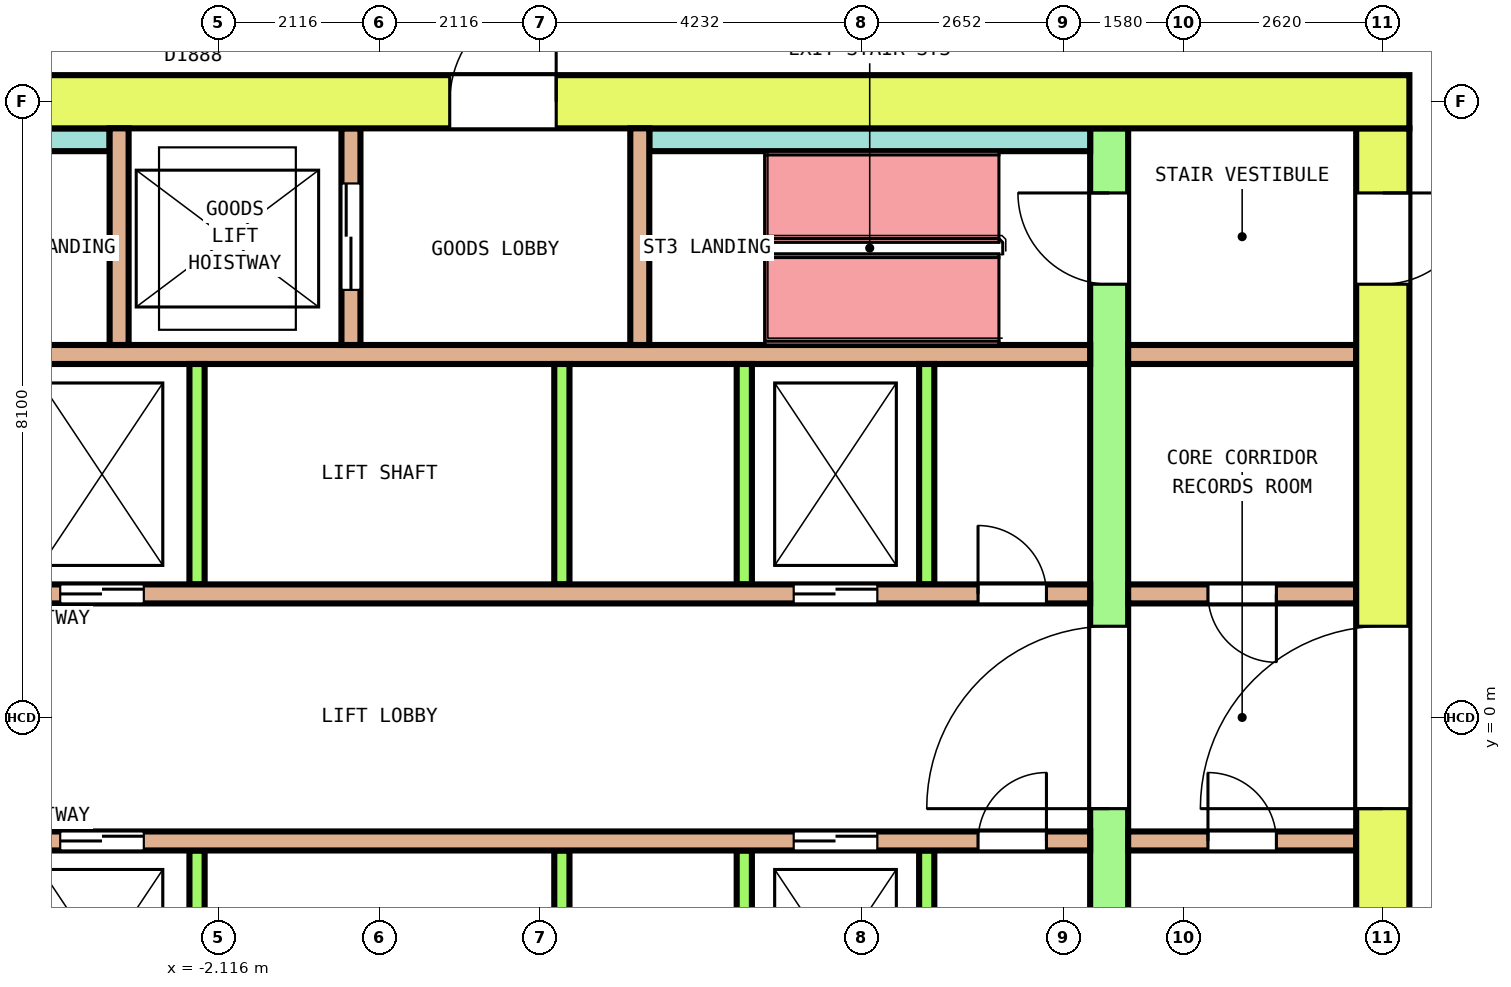
"""IFC4 building model, lengths in metres.
Left out: names, types, materials, properties, quantities, classifications, styles, units other than length and angle.
Written with IfcOpenShell. Run it as: python <this file> out.ifc"""

import sys

from ifc_helpers import new_model, si_unit, direction, frame, frame_2d, origin, place, context, subcontext, project, spatial, rectangle, extrude, element, fill, save


model = new_model("IFC4")
c1 = context("Model", 3, precision=1e-05, world=origin(), true_north=direction((0.0, 1.0)))
c2 = subcontext(c1, "Body", "Model", "MODEL_VIEW")
j1 = project(units=[si_unit("LENGTHUNIT", "METRE"), si_unit("PLANEANGLEUNIT", "RADIAN")], contexts=[c1])
p1 = place(None, origin())
s1 = spatial("IfcSite", under=j1, at=p1, CompositionType="ELEMENT")
p2 = place(p1, origin())
s2 = spatial("IfcBuilding", under=s1, at=p2, CompositionType="ELEMENT")
p3 = place(p2, frame((0.0, 0.0, 189.2)))
s3 = spatial("IfcBuildingStorey", under=s2, at=p3, CompositionType="ELEMENT", Elevation=189.2)
p4 = place(p3, frame((-13.55, 8.1, 0.0), z_axis=(0.0, 0.0, 1.0), x_axis=(1.0, 0.0, 0.0)))
e1 = element("IfcWall", 1, at=p4, inside=s3, PredefinedType="SHEAR", context=c2, shape_type="SweptSolid", body=[
    extrude(rectangle(XDim=27.1, YDim=0.7, at=frame_2d((13.55, 0.0))), origin(), (0.0, 0.0, 1.0), 4.1),
])
p5 = place(p4, frame((14.475, 0.0, 0.0)))
e2 = element("IfcOpeningElement", 2, at=p5, cuts=e1, PredefinedType="OPENING", context=c2, shape_type="SweptSolid", body=[
    extrude(rectangle(XDim=1.4, YDim=2.1, at=frame_2d((0.7, 1.05))), frame((0.0, 0.36, 0.0), z_axis=(0.0, -1.0, 0.0), x_axis=(1.0, 0.0, 0.0)), (0.0, 0.0, 1.0), 0.72),
])
p6 = place(p3, frame((13.2, -7.75, 0.0), z_axis=(0.0, 0.0, 1.0), x_axis=(0.0, 1.0, 0.0)))
e3 = element("IfcWall", 3, at=p6, inside=s3, PredefinedType="SHEAR", context=c2, shape_type="SweptSolid", body=[
    extrude(rectangle(XDim=15.5, YDim=0.7, at=frame_2d((7.75, 0.0))), origin(), (0.0, 0.0, 1.0), 4.1),
])
p7 = place(p6, frame((6.55, 0.0, 0.0)))
e4 = element("IfcOpeningElement", 4, at=p7, cuts=e3, PredefinedType="OPENING", context=c2, shape_type="SweptSolid", body=[
    extrude(rectangle(XDim=2.4, YDim=2.1, at=frame_2d((1.2, 1.05))), frame((0.0, 0.36, 0.0), z_axis=(0.0, -1.0, 0.0), x_axis=(1.0, 0.0, 0.0)), (0.0, 0.0, 1.0), 0.72),
])
p8 = place(p6, frame((13.45, 0.0, 0.0)))
e5 = element("IfcOpeningElement", 5, at=p8, cuts=e3, PredefinedType="OPENING", context=c2, shape_type="SweptSolid", body=[
    extrude(rectangle(XDim=1.2, YDim=2.1, at=frame_2d((0.6, 1.05))), frame((0.0, 0.36, 0.0), z_axis=(0.0, -1.0, 0.0), x_axis=(1.0, 0.0, 0.0)), (0.0, 0.0, 1.0), 0.72),
])
p9 = place(p6, frame((0.181, 0.0, 0.0)))
e6 = element("IfcOpeningElement", 6, at=p9, cuts=e3, PredefinedType="OPENING", context=c2, shape_type="SweptSolid", body=[
    extrude(rectangle(XDim=1.0, YDim=2.1, at=frame_2d((0.5, 1.05))), frame((0.0, 0.36, 0.0), z_axis=(0.0, -1.0, 0.0), x_axis=(1.0, 0.0, 0.0)), (0.0, 0.0, 1.0), 0.72),
])
p10 = place(p6, frame((1.669, 0.0, 0.0)))
e7 = element("IfcOpeningElement", 7, at=p10, cuts=e3, PredefinedType="OPENING", context=c2, shape_type="SweptSolid", body=[
    extrude(rectangle(XDim=1.0, YDim=2.1, at=frame_2d((0.5, 1.05))), frame((0.0, 0.36, 0.0), z_axis=(0.0, -1.0, 0.0), x_axis=(1.0, 0.0, 0.0)), (0.0, 0.0, 1.0), 0.72),
])
p11 = place(p3, frame((9.6, -7.75, 0.0), z_axis=(0.0, 0.0, 1.0), x_axis=(0.0, 1.0, 0.0)))
e8 = element("IfcWall", 8, at=p11, inside=s3, PredefinedType="SHEAR", context=c2, shape_type="SweptSolid", body=[
    extrude(rectangle(XDim=15.5, YDim=0.5, at=frame_2d((7.75, 0.0))), origin(), (0.0, 0.0, 1.0), 4.1),
])
p12 = place(p11, frame((6.55, 0.0, 0.0)))
e9 = element("IfcOpeningElement", 9, at=p12, cuts=e8, PredefinedType="OPENING", context=c2, shape_type="SweptSolid", body=[
    extrude(rectangle(XDim=2.4, YDim=2.1, at=frame_2d((1.2, 1.05))), frame((0.0, 0.26, 0.0), z_axis=(0.0, -1.0, 0.0), x_axis=(1.0, 0.0, 0.0)), (0.0, 0.0, 1.0), 0.52),
])
p13 = place(p11, frame((13.45, 0.0, 0.0)))
e10 = element("IfcOpeningElement", 10, at=p13, cuts=e8, PredefinedType="OPENING", context=c2, shape_type="SweptSolid", body=[
    extrude(rectangle(XDim=1.2, YDim=2.1, at=frame_2d((0.6, 1.05))), frame((0.0, 0.26, 0.0), z_axis=(0.0, -1.0, 0.0), x_axis=(1.0, 0.0, 0.0)), (0.0, 0.0, 1.0), 0.52),
])
p14 = place(p11, frame((0.95, 0.0, 0.0)))
e11 = element("IfcOpeningElement", 11, at=p14, cuts=e8, PredefinedType="OPENING", context=c2, shape_type="SweptSolid", body=[
    extrude(rectangle(XDim=1.0, YDim=2.1, at=frame_2d((0.5, 1.05))), frame((0.0, 0.26, 0.0), z_axis=(0.0, -1.0, 0.0), x_axis=(1.0, 0.0, 0.0)), (0.0, 0.0, 1.0), 0.52),
])
p15 = place(p3, frame((-9.35, 1.625, 0.0), z_axis=(0.0, 0.0, 1.0), x_axis=(1.0, 0.0, 0.0)))
e12 = element("IfcWall", 12, at=p15, inside=s3, PredefinedType="SOLIDWALL", context=c2, shape_type="SweptSolid", body=[
    extrude(rectangle(XDim=18.7, YDim=0.25, at=frame_2d((9.35, 0.0))), origin(), (0.0, 0.0, 1.0), 4.1),
])
p16 = place(p15, frame((2.85, 0.0, 0.0)))
e13 = element("IfcOpeningElement", 13, at=p16, cuts=e12, PredefinedType="OPENING", context=c2, shape_type="SweptSolid", body=[
    extrude(rectangle(XDim=1.1, YDim=2.1, at=frame_2d((0.55, 1.05))), frame((0.0, 0.135, 0.0), z_axis=(0.0, -1.0, 0.0), x_axis=(1.0, 0.0, 0.0)), (0.0, 0.0, 1.0), 0.27),
])
p17 = place(p15, frame((5.15, 0.0, 0.0)))
e14 = element("IfcOpeningElement", 14, at=p17, cuts=e12, PredefinedType="OPENING", context=c2, shape_type="SweptSolid", body=[
    extrude(rectangle(XDim=1.1, YDim=2.1, at=frame_2d((0.55, 1.05))), frame((0.0, 0.135, 0.0), z_axis=(0.0, -1.0, 0.0), x_axis=(1.0, 0.0, 0.0)), (0.0, 0.0, 1.0), 0.27),
])
p18 = place(p15, frame((14.8, 0.0, 0.0)))
e15 = element("IfcOpeningElement", 15, at=p18, cuts=e12, PredefinedType="OPENING", context=c2, shape_type="SweptSolid", body=[
    extrude(rectangle(XDim=1.1, YDim=2.1, at=frame_2d((0.55, 1.05))), frame((0.0, 0.135, 0.0), z_axis=(0.0, -1.0, 0.0), x_axis=(1.0, 0.0, 0.0)), (0.0, 0.0, 1.0), 0.27),
])
p19 = place(p15, frame((0.575, 0.0, 0.0)))
e16 = element("IfcOpeningElement", 16, at=p19, cuts=e12, PredefinedType="OPENING", context=c2, shape_type="SweptSolid", body=[
    extrude(rectangle(XDim=0.9, YDim=2.1, at=frame_2d((0.45, 1.05))), frame((0.0, 0.135, 0.0), z_axis=(0.0, -1.0, 0.0), x_axis=(1.0, 0.0, 0.0)), (0.0, 0.0, 1.0), 0.27),
])
p20 = place(p15, frame((17.225, 0.0, 0.0)))
e17 = element("IfcOpeningElement", 17, at=p20, cuts=e12, PredefinedType="OPENING", context=c2, shape_type="SweptSolid", body=[
    extrude(rectangle(XDim=0.9, YDim=2.1, at=frame_2d((0.45, 1.05))), frame((0.0, 0.135, 0.0), z_axis=(0.0, -1.0, 0.0), x_axis=(1.0, 0.0, 0.0)), (0.0, 0.0, 1.0), 0.27),
])
p21 = place(p3, frame((9.85, 1.625, 0.0), z_axis=(0.0, 0.0, 1.0), x_axis=(1.0, 0.0, 0.0)))
e18 = element("IfcWall", 18, at=p21, inside=s3, PredefinedType="SOLIDWALL", context=c2, shape_type="SweptSolid", body=[
    extrude(rectangle(XDim=3.0, YDim=0.25, at=frame_2d((1.5, 0.0))), origin(), (0.0, 0.0, 1.0), 4.1),
])
p22 = place(p21, frame((1.05, 0.0, 0.0)))
e19 = element("IfcOpeningElement", 19, at=p22, cuts=e18, PredefinedType="OPENING", context=c2, shape_type="SweptSolid", body=[
    extrude(rectangle(XDim=0.9, YDim=2.1, at=frame_2d((0.45, 1.05))), frame((0.0, 0.135, 0.0), z_axis=(0.0, -1.0, 0.0), x_axis=(1.0, 0.0, 0.0)), (0.0, 0.0, 1.0), 0.27),
])
p23 = place(p3, frame((-9.35, 4.775, 0.0), z_axis=(0.0, 0.0, 1.0), x_axis=(1.0, 0.0, 0.0)))
e20 = element("IfcWall", 20, at=p23, inside=s3, PredefinedType="SOLIDWALL", context=c2, shape_type="SweptSolid", body=[
    extrude(rectangle(XDim=18.7, YDim=0.25, at=frame_2d((9.35, 0.0))), origin(), (0.0, 0.0, 1.0), 4.1),
])
p24 = place(p3, frame((9.85, 4.775, 0.0), z_axis=(0.0, 0.0, 1.0), x_axis=(1.0, 0.0, 0.0)))
e21 = element("IfcWall", 21, at=p24, inside=s3, PredefinedType="SOLIDWALL", context=c2, shape_type="SweptSolid", body=[
    extrude(rectangle(XDim=3.0, YDim=0.25, at=frame_2d((1.5, 0.0))), origin(), (0.0, 0.0, 1.0), 4.1),
])
for number, where, z_axis, x_axis in (
    (22, (-2.4, 1.75, 0.0), (0.0, 0.0, 1.0), (0.0, 1.0, 0.0)),
    (23, (2.4, 1.75, 0.0), (0.0, 0.0, 1.0), (0.0, 1.0, 0.0)),
    (24, (4.8, 1.75, 0.0), (0.0, 0.0, 1.0), (0.0, 1.0, 0.0)),
    (25, (7.2, 1.75, 0.0), (0.0, 0.0, 1.0), (0.0, 1.0, 0.0)),
):
    element("IfcWall", number, at=place(p3, frame(where, z_axis=z_axis, x_axis=x_axis)), inside=s3, PredefinedType="SOLIDWALL", context=c2, shape_type="SweptSolid", body=[
        extrude(rectangle(XDim=2.9, YDim=0.2, at=frame_2d((1.45, 0.0))), origin(), (0.0, 0.0, 1.0), 4.1),
    ])
p25 = place(p3, frame((-9.35, -1.625, 0.0), z_axis=(0.0, 0.0, 1.0), x_axis=(1.0, 0.0, 0.0)))
e26 = element("IfcWall", 26, at=p25, inside=s3, PredefinedType="SOLIDWALL", context=c2, shape_type="SweptSolid", body=[
    extrude(rectangle(XDim=18.7, YDim=0.25, at=frame_2d((9.35, 0.0))), origin(), (0.0, 0.0, 1.0), 4.1),
])
p26 = place(p25, frame((2.85, 0.0, 0.0)))
e27 = element("IfcOpeningElement", 27, at=p26, cuts=e26, PredefinedType="OPENING", context=c2, shape_type="SweptSolid", body=[
    extrude(rectangle(XDim=1.1, YDim=2.1, at=frame_2d((0.55, 1.05))), frame((0.0, 0.135, 0.0), z_axis=(0.0, -1.0, 0.0), x_axis=(1.0, 0.0, 0.0)), (0.0, 0.0, 1.0), 0.27),
])
p27 = place(p25, frame((5.15, 0.0, 0.0)))
e28 = element("IfcOpeningElement", 28, at=p27, cuts=e26, PredefinedType="OPENING", context=c2, shape_type="SweptSolid", body=[
    extrude(rectangle(XDim=1.1, YDim=2.1, at=frame_2d((0.55, 1.05))), frame((0.0, 0.135, 0.0), z_axis=(0.0, -1.0, 0.0), x_axis=(1.0, 0.0, 0.0)), (0.0, 0.0, 1.0), 0.27),
])
p28 = place(p25, frame((14.8, 0.0, 0.0)))
e29 = element("IfcOpeningElement", 29, at=p28, cuts=e26, PredefinedType="OPENING", context=c2, shape_type="SweptSolid", body=[
    extrude(rectangle(XDim=1.1, YDim=2.1, at=frame_2d((0.55, 1.05))), frame((0.0, 0.135, 0.0), z_axis=(0.0, -1.0, 0.0), x_axis=(1.0, 0.0, 0.0)), (0.0, 0.0, 1.0), 0.27),
])
p29 = place(p25, frame((0.575, 0.0, 0.0)))
e30 = element("IfcOpeningElement", 30, at=p29, cuts=e26, PredefinedType="OPENING", context=c2, shape_type="SweptSolid", body=[
    extrude(rectangle(XDim=0.9, YDim=2.1, at=frame_2d((0.45, 1.05))), frame((0.0, 0.135, 0.0), z_axis=(0.0, -1.0, 0.0), x_axis=(1.0, 0.0, 0.0)), (0.0, 0.0, 1.0), 0.27),
])
p30 = place(p25, frame((17.225, 0.0, 0.0)))
e31 = element("IfcOpeningElement", 31, at=p30, cuts=e26, PredefinedType="OPENING", context=c2, shape_type="SweptSolid", body=[
    extrude(rectangle(XDim=0.9, YDim=2.1, at=frame_2d((0.45, 1.05))), frame((0.0, 0.135, 0.0), z_axis=(0.0, -1.0, 0.0), x_axis=(1.0, 0.0, 0.0)), (0.0, 0.0, 1.0), 0.27),
])
p31 = place(p3, frame((9.85, -1.625, 0.0), z_axis=(0.0, 0.0, 1.0), x_axis=(1.0, 0.0, 0.0)))
e32 = element("IfcWall", 32, at=p31, inside=s3, PredefinedType="SOLIDWALL", context=c2, shape_type="SweptSolid", body=[
    extrude(rectangle(XDim=3.0, YDim=0.25, at=frame_2d((1.5, 0.0))), origin(), (0.0, 0.0, 1.0), 4.1),
])
p32 = place(p31, frame((1.05, 0.0, 0.0)))
e33 = element("IfcOpeningElement", 33, at=p32, cuts=e32, PredefinedType="OPENING", context=c2, shape_type="SweptSolid", body=[
    extrude(rectangle(XDim=0.9, YDim=2.1, at=frame_2d((0.45, 1.05))), frame((0.0, 0.135, 0.0), z_axis=(0.0, -1.0, 0.0), x_axis=(1.0, 0.0, 0.0)), (0.0, 0.0, 1.0), 0.27),
])
for number, where, z_axis, x_axis in (
    (34, (-2.4, -4.65, 0.0), (0.0, 0.0, 1.0), (0.0, 1.0, 0.0)),
    (35, (2.4, -4.65, 0.0), (0.0, 0.0, 1.0), (0.0, 1.0, 0.0)),
    (36, (4.8, -4.65, 0.0), (0.0, 0.0, 1.0), (0.0, 1.0, 0.0)),
    (37, (7.2, -4.65, 0.0), (0.0, 0.0, 1.0), (0.0, 1.0, 0.0)),
):
    element("IfcWall", number, at=place(p3, frame(where, z_axis=z_axis, x_axis=x_axis)), inside=s3, PredefinedType="SOLIDWALL", context=c2, shape_type="SweptSolid", body=[
        extrude(rectangle(XDim=2.9, YDim=0.2, at=frame_2d((1.45, 0.0))), origin(), (0.0, 0.0, 1.0), 4.1),
    ])
for number, where, z_axis, x_axis in (
    (38, (-9.35, 7.6, 0.0), (0.0, 0.0, 1.0), (1.0, 0.0, 0.0)),
    (39, (3.55, 7.6, 0.0), (0.0, 0.0, 1.0), (1.0, 0.0, 0.0)),
):
    element("IfcWall", number, at=place(p3, frame(where, z_axis=z_axis, x_axis=x_axis)), inside=s3, PredefinedType="SOLIDWALL", context=c2, shape_type="SweptSolid", body=[
        extrude(rectangle(XDim=5.8, YDim=0.3, at=frame_2d((2.9, 0.0))), origin(), (0.0, 0.0, 1.0), 4.1),
    ])
p33 = place(p3, frame((-3.425, 4.9, 0.0), z_axis=(0.0, 0.0, 1.0), x_axis=(0.0, 1.0, 0.0)))
e40 = element("IfcWall", 40, at=p33, inside=s3, PredefinedType="SOLIDWALL", context=c2, shape_type="SweptSolid", body=[
    extrude(rectangle(XDim=2.85, YDim=0.25, at=frame_2d((1.425, 0.0))), origin(), (0.0, 0.0, 1.0), 4.1),
])
p34 = place(p3, frame((-0.375, 4.9, 0.0), z_axis=(0.0, 0.0, 1.0), x_axis=(0.0, 1.0, 0.0)))
e41 = element("IfcWall", 41, at=p34, inside=s3, PredefinedType="SOLIDWALL", context=c2, shape_type="SweptSolid", body=[
    extrude(rectangle(XDim=2.85, YDim=0.25, at=frame_2d((1.425, 0.0))), origin(), (0.0, 0.0, 1.0), 4.1),
])
p35 = place(p34, frame((0.725, 0.0, 0.0)))
e42 = element("IfcOpeningElement", 42, at=p35, cuts=e41, PredefinedType="OPENING", context=c2, shape_type="SweptSolid", body=[
    extrude(rectangle(XDim=1.4, YDim=2.1, at=frame_2d((0.7, 1.05))), frame((0.0, 0.135, 0.0), z_axis=(0.0, -1.0, 0.0), x_axis=(1.0, 0.0, 0.0)), (0.0, 0.0, 1.0), 0.27),
])
p36 = place(p3, frame((3.425, 4.9, 0.0), z_axis=(0.0, 0.0, 1.0), x_axis=(0.0, 1.0, 0.0)))
e43 = element("IfcWall", 43, at=p36, inside=s3, PredefinedType="SOLIDWALL", context=c2, shape_type="SweptSolid", body=[
    extrude(rectangle(XDim=2.85, YDim=0.25, at=frame_2d((1.425, 0.0))), origin(), (0.0, 0.0, 1.0), 4.1),
])
p37 = place(p17, origin())
e44 = element("IfcDoor", 44, at=p37, inside=s3, OperationType="DOUBLE_DOOR_SLIDING", PredefinedType="DOOR", context=c2, shape_type="SweptSolid", body=[
    extrude(rectangle(XDim=1.1, YDim=2.1, at=frame_2d((0.55, 1.05))), frame((0.0, 0.075, 0.0), z_axis=(0.0, -1.0, 0.0), x_axis=(1.0, 0.0, 0.0)), (0.0, 0.0, 1.0), 0.15),
])
fill(e14, e44)
p38 = place(p18, origin())
e45 = element("IfcDoor", 45, at=p38, inside=s3, OperationType="DOUBLE_DOOR_SLIDING", PredefinedType="DOOR", context=c2, shape_type="SweptSolid", body=[
    extrude(rectangle(XDim=1.1, YDim=2.1, at=frame_2d((0.55, 1.05))), frame((0.0, 0.075, 0.0), z_axis=(0.0, -1.0, 0.0), x_axis=(1.0, 0.0, 0.0)), (0.0, 0.0, 1.0), 0.15),
])
fill(e15, e45)
p39 = place(p27, origin())
e46 = element("IfcDoor", 46, at=p39, inside=s3, OperationType="DOUBLE_DOOR_SLIDING", PredefinedType="DOOR", context=c2, shape_type="SweptSolid", body=[
    extrude(rectangle(XDim=1.1, YDim=2.1, at=frame_2d((0.55, 1.05))), frame((0.0, 0.075, 0.0), z_axis=(0.0, -1.0, 0.0), x_axis=(1.0, 0.0, 0.0)), (0.0, 0.0, 1.0), 0.15),
])
fill(e28, e46)
p40 = place(p28, origin())
e47 = element("IfcDoor", 47, at=p40, inside=s3, OperationType="DOUBLE_DOOR_SLIDING", PredefinedType="DOOR", context=c2, shape_type="SweptSolid", body=[
    extrude(rectangle(XDim=1.1, YDim=2.1, at=frame_2d((0.55, 1.05))), frame((0.0, 0.075, 0.0), z_axis=(0.0, -1.0, 0.0), x_axis=(1.0, 0.0, 0.0)), (0.0, 0.0, 1.0), 0.15),
])
fill(e29, e47)
p41 = place(p35, origin())
e48 = element("IfcDoor", 48, at=p41, inside=s3, OperationType="DOUBLE_DOOR_SLIDING", PredefinedType="DOOR", context=c2, shape_type="SweptSolid", body=[
    extrude(rectangle(XDim=1.4, YDim=2.1, at=frame_2d((0.7, 1.05))), frame((0.0, 0.075, 0.0), z_axis=(0.0, -1.0, 0.0), x_axis=(1.0, 0.0, 0.0)), (0.0, 0.0, 1.0), 0.15),
])
fill(e42, e48)
p42 = place(p12, origin())
e49 = element("IfcDoor", 49, at=p42, inside=s3, OperationType="DOUBLE_DOOR_SINGLE_SWING", PredefinedType="DOOR", context=c2, shape_type="SweptSolid", body=[
    extrude(rectangle(XDim=2.4, YDim=2.1, at=frame_2d((1.2, 1.05))), frame((0.0, 0.2, 0.0), z_axis=(0.0, -1.0, 0.0), x_axis=(1.0, 0.0, 0.0)), (0.0, 0.0, 1.0), 0.4),
])
fill(e9, e49)
p43 = place(p7, origin())
e50 = element("IfcDoor", 50, at=p43, inside=s3, OperationType="DOUBLE_DOOR_SINGLE_SWING", PredefinedType="DOOR", context=c2, shape_type="SweptSolid", body=[
    extrude(rectangle(XDim=2.4, YDim=2.1, at=frame_2d((1.2, 1.05))), frame((0.0, 0.3, 0.0), z_axis=(0.0, -1.0, 0.0), x_axis=(1.0, 0.0, 0.0)), (0.0, 0.0, 1.0), 0.6),
])
fill(e4, e50)
p44 = place(p13, origin())
e51 = element("IfcDoor", 51, at=p44, inside=s3, OperationType="SINGLE_SWING_RIGHT", PredefinedType="DOOR", context=c2, shape_type="SweptSolid", body=[
    extrude(rectangle(XDim=1.2, YDim=2.1, at=frame_2d((0.6, 1.05))), frame((0.0, 0.2, 0.0), z_axis=(0.0, -1.0, 0.0), x_axis=(1.0, 0.0, 0.0)), (0.0, 0.0, 1.0), 0.4),
])
fill(e10, e51)
p45 = place(p8, origin())
e52 = element("IfcDoor", 52, at=p45, inside=s3, OperationType="SINGLE_SWING_LEFT", PredefinedType="DOOR", context=c2, shape_type="SweptSolid", body=[
    extrude(rectangle(XDim=1.2, YDim=2.1, at=frame_2d((0.6, 1.05))), frame((0.0, 0.3, 0.0), z_axis=(0.0, -1.0, 0.0), x_axis=(1.0, 0.0, 0.0)), (0.0, 0.0, 1.0), 0.6),
])
fill(e5, e52)
p46 = place(p5, origin())
e53 = element("IfcDoor", 53, at=p46, inside=s3, OperationType="DOUBLE_DOOR_SINGLE_SWING", PredefinedType="DOOR", context=c2, shape_type="SweptSolid", body=[
    extrude(rectangle(XDim=1.4, YDim=2.1, at=frame_2d((0.7, 1.05))), frame((0.0, 0.3, 0.0), z_axis=(0.0, -1.0, 0.0), x_axis=(1.0, 0.0, 0.0)), (0.0, 0.0, 1.0), 0.6),
])
fill(e2, e53)
p47 = place(p20, origin())
e54 = element("IfcDoor", 54, at=p47, inside=s3, OperationType="SINGLE_SWING_RIGHT", PredefinedType="DOOR", context=c2, shape_type="SweptSolid", body=[
    extrude(rectangle(XDim=0.9, YDim=2.1, at=frame_2d((0.45, 1.05))), frame((0.0, 0.075, 0.0), z_axis=(0.0, -1.0, 0.0), x_axis=(1.0, 0.0, 0.0)), (0.0, 0.0, 1.0), 0.15),
])
fill(e17, e54)
p48 = place(p22, origin())
e55 = element("IfcDoor", 55, at=p48, inside=s3, OperationType="SINGLE_SWING_LEFT", PredefinedType="DOOR", context=c2, shape_type="SweptSolid", body=[
    extrude(rectangle(XDim=0.9, YDim=2.1, at=frame_2d((0.45, 1.05))), frame((0.0, 0.075, 0.0), z_axis=(0.0, -1.0, 0.0), x_axis=(1.0, 0.0, 0.0)), (0.0, 0.0, 1.0), 0.15),
])
fill(e19, e55)
p49 = place(p30, origin())
e56 = element("IfcDoor", 56, at=p49, inside=s3, OperationType="SINGLE_SWING_LEFT", PredefinedType="DOOR", context=c2, shape_type="SweptSolid", body=[
    extrude(rectangle(XDim=0.9, YDim=2.1, at=frame_2d((0.45, 1.05))), frame((0.0, 0.075, 0.0), z_axis=(0.0, -1.0, 0.0), x_axis=(1.0, 0.0, 0.0)), (0.0, 0.0, 1.0), 0.15),
])
fill(e31, e56)
p50 = place(p32, origin())
e57 = element("IfcDoor", 57, at=p50, inside=s3, OperationType="SINGLE_SWING_RIGHT", PredefinedType="DOOR", context=c2, shape_type="SweptSolid", body=[
    extrude(rectangle(XDim=0.9, YDim=2.1, at=frame_2d((0.45, 1.05))), frame((0.0, 0.075, 0.0), z_axis=(0.0, -1.0, 0.0), x_axis=(1.0, 0.0, 0.0)), (0.0, 0.0, 1.0), 0.15),
])
fill(e33, e57)
save(model, sys.argv[1])
